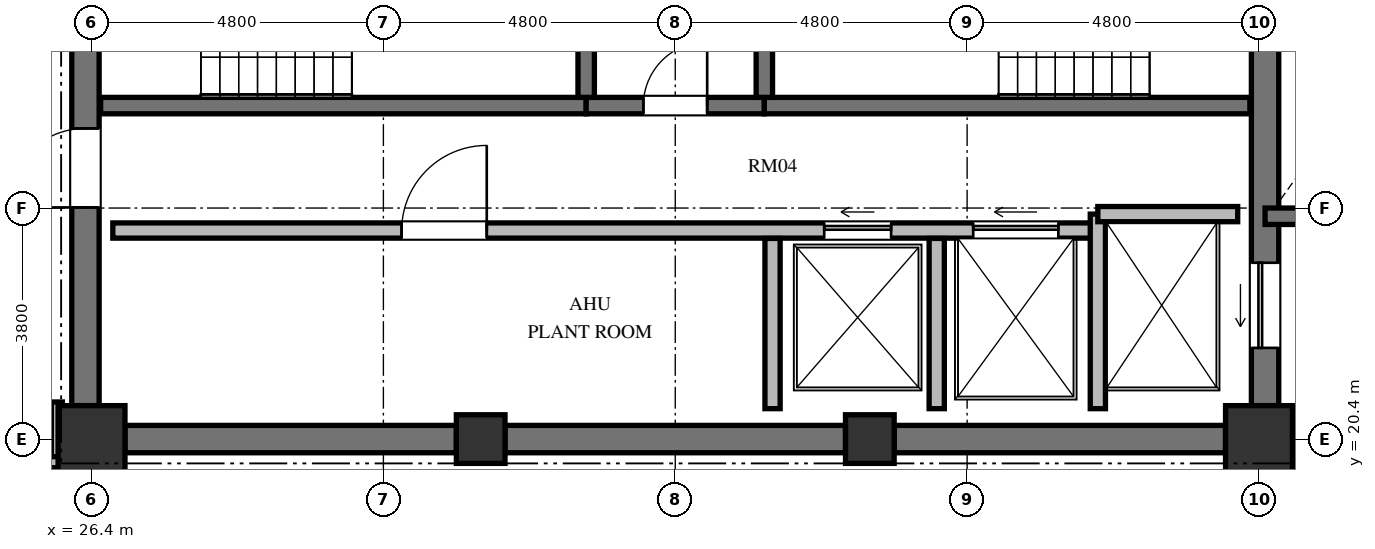
"""IFC4 building model, lengths in metres.
Left out: names, types, materials, properties, quantities, classifications, styles, units other than length and angle.
Written with IfcOpenShell. Run it as: python <this file> out.ifc"""

import sys

from ifc_helpers import new_model, si_unit, direction, frame, frame_2d, origin, origin_2d, place, context, subcontext, project, spatial, rectangle, extrude, element, fill, save


model = new_model("IFC4")
c1 = context("Model", 3, precision=1e-05, world=origin(), true_north=direction((0.0, 1.0)))
c2 = subcontext(c1, "Body", "Model", "MODEL_VIEW")
j1 = project(units=[si_unit("LENGTHUNIT", "METRE"), si_unit("PLANEANGLEUNIT", "RADIAN")], contexts=[c1])
p1 = place(None, origin())
s1 = spatial("IfcSite", under=j1, at=p1, CompositionType="ELEMENT")
p2 = place(p1, origin())
s2 = spatial("IfcBuilding", under=s1, at=p2, CompositionType="ELEMENT")
p3 = place(p2, frame((0.0, 0.0, 245.904)))
s3 = spatial("IfcBuildingStorey", under=s2, at=p3, CompositionType="ELEMENT", Elevation=245.904)
p4 = place(p3, frame((26.4, 20.4, 0.0), z_axis=(0.0, 0.0, 1.0), x_axis=(1.0, 0.0, 0.0)))
e1 = element("IfcColumn", 1, at=p4, inside=s3, PredefinedType="COLUMN", context=c2, shape_type="SweptSolid", body=[
    extrude(rectangle(XDim=1.1, YDim=1.1, at=origin_2d()), origin(), (0.0, 0.0, 1.0), 5.472),
])
for number, where, z_axis, x_axis in (
    (2, (32.8, 20.4, 0.0), (0.0, 0.0, 1.0), (1.0, 0.0, 0.0)),
    (3, (39.2, 20.4, 0.0), (0.0, 0.0, 1.0), (1.0, 0.0, 0.0)),
):
    element("IfcColumn", number, at=place(p3, frame(where, z_axis=z_axis, x_axis=x_axis)), inside=s3, PredefinedType="COLUMN", context=c2, shape_type="SweptSolid", body=[
        extrude(rectangle(XDim=0.8, YDim=0.8, at=origin_2d()), origin(), (0.0, 0.0, 1.0), 5.472),
    ])
p5 = place(p3, frame((45.6, 20.4, 0.0), z_axis=(0.0, 0.0, 1.0), x_axis=(1.0, 0.0, 0.0)))
e4 = element("IfcColumn", 4, at=p5, inside=s3, PredefinedType="COLUMN", context=c2, shape_type="SweptSolid", body=[
    extrude(rectangle(XDim=1.1, YDim=1.1, at=origin_2d()), origin(), (0.0, 0.0, 1.0), 5.472),
])
p6 = place(p3, frame((26.3, 20.95, 0.0), z_axis=(0.0, 0.0, 1.0), x_axis=(0.0, 1.0, 0.0)))
e5 = element("IfcWall", 5, at=p6, inside=s3, PredefinedType="SHEAR", context=c2, shape_type="SweptSolid", body=[
    extrude(rectangle(XDim=14.1, YDim=0.45, at=frame_2d((7.05, 0.0))), origin(), (0.0, 0.0, 1.0), 5.472),
])
p7 = place(p6, frame((6.5, 0.0, 0.0)))
e6 = element("IfcOpeningElement", 6, at=p7, cuts=e5, PredefinedType="OPENING", context=c2, shape_type="SweptSolid", body=[
    extrude(rectangle(XDim=1.2, YDim=2.15, at=frame_2d((0.6, 1.075))), frame((0.0, 0.235, 0.0), z_axis=(0.0, -1.0, 0.0), x_axis=(1.0, 0.0, 0.0)), (0.0, 0.0, 1.0), 0.47),
])
p8 = place(p6, frame((9.6, 0.0, 0.0)))
e7 = element("IfcOpeningElement", 7, at=p8, cuts=e5, PredefinedType="OPENING", context=c2, shape_type="SweptSolid", body=[
    extrude(rectangle(XDim=1.3, YDim=2.2, at=frame_2d((0.65, 1.1))), frame((0.0, 0.235, 0.0), z_axis=(0.0, -1.0, 0.0), x_axis=(1.0, 0.0, 0.0)), (0.0, 0.0, 1.0), 0.47),
])
p9 = place(p6, frame((3.26, 0.0, 0.0)))
e8 = element("IfcOpeningElement", 8, at=p9, cuts=e5, PredefinedType="OPENING", context=c2, shape_type="SweptSolid", body=[
    extrude(rectangle(XDim=1.3, YDim=2.2, at=frame_2d((0.65, 1.1))), frame((0.0, 0.235, 0.0), z_axis=(0.0, -1.0, 0.0), x_axis=(1.0, 0.0, 0.0)), (0.0, 0.0, 1.0), 0.47),
])
p10 = place(p3, frame((45.7, 20.95, 0.0), z_axis=(0.0, 0.0, 1.0), x_axis=(0.0, 1.0, 0.0)))
e9 = element("IfcWall", 9, at=p10, inside=s3, PredefinedType="SHEAR", context=c2, shape_type="SweptSolid", body=[
    extrude(rectangle(XDim=14.1, YDim=0.45, at=frame_2d((7.05, 0.0))), origin(), (0.0, 0.0, 1.0), 5.472),
])
p11 = place(p10, frame((11.75, 0.0, 0.0)))
e10 = element("IfcOpeningElement", 10, at=p11, cuts=e9, PredefinedType="OPENING", context=c2, shape_type="SweptSolid", body=[
    extrude(rectangle(XDim=1.4, YDim=2.3, at=frame_2d((0.7, 1.15))), frame((0.0, 0.235, 0.0), z_axis=(0.0, -1.0, 0.0), x_axis=(1.0, 0.0, 0.0)), (0.0, 0.0, 1.0), 0.47),
])
p12 = place(p10, frame((0.95, 0.0, 0.0)))
e11 = element("IfcOpeningElement", 11, at=p12, cuts=e9, PredefinedType="OPENING", context=c2, shape_type="SweptSolid", body=[
    extrude(rectangle(XDim=1.4, YDim=2.3, at=frame_2d((0.7, 1.15))), frame((0.0, 0.235, 0.0), z_axis=(0.0, -1.0, 0.0), x_axis=(1.0, 0.0, 0.0)), (0.0, 0.0, 1.0), 0.47),
])
p13 = place(p3, frame((26.95, 20.4, 0.0), z_axis=(0.0, 0.0, 1.0), x_axis=(1.0, 0.0, 0.0)))
e12 = element("IfcWall", 12, at=p13, inside=s3, PredefinedType="SHEAR", context=c2, shape_type="SweptSolid", body=[
    extrude(rectangle(XDim=5.45, YDim=0.45, at=frame_2d((2.725, 0.0))), origin(), (0.0, 0.0, 1.0), 5.472),
])
p14 = place(p3, frame((33.2, 20.4, 0.0), z_axis=(0.0, 0.0, 1.0), x_axis=(1.0, 0.0, 0.0)))
e13 = element("IfcWall", 13, at=p14, inside=s3, PredefinedType="SHEAR", context=c2, shape_type="SweptSolid", body=[
    extrude(rectangle(XDim=5.6, YDim=0.45, at=frame_2d((2.8, 0.0))), origin(), (0.0, 0.0, 1.0), 5.472),
])
p15 = place(p3, frame((39.6, 20.4, 0.0), z_axis=(0.0, 0.0, 1.0), x_axis=(1.0, 0.0, 0.0)))
e14 = element("IfcWall", 14, at=p15, inside=s3, PredefinedType="SHEAR", context=c2, shape_type="SweptSolid", body=[
    extrude(rectangle(XDim=5.45, YDim=0.45, at=frame_2d((2.725, 0.0))), origin(), (0.0, 0.0, 1.0), 5.472),
])
p16 = place(p3, frame((26.55, 25.885, 0.0), z_axis=(0.0, 0.0, 1.0), x_axis=(1.0, 0.0, 0.0)))
e15 = element("IfcWall", 15, at=p16, inside=s3, PredefinedType="SHEAR", context=c2, shape_type="SweptSolid", body=[
    extrude(rectangle(XDim=7.985, YDim=0.27, at=frame_2d((3.992, 0.0))), origin(), (0.0, 0.0, 1.0), 5.472),
])
p17 = place(p3, frame((34.535, 25.885, 0.0), z_axis=(0.0, 0.0, 1.0), x_axis=(1.0, 0.0, 0.0)))
e16 = element("IfcWall", 16, at=p17, inside=s3, PredefinedType="SHEAR", context=c2, shape_type="SweptSolid", body=[
    extrude(rectangle(XDim=2.93, YDim=0.27, at=frame_2d((1.465, 0.0))), origin(), (0.0, 0.0, 1.0), 5.472),
])
p18 = place(p17, frame((0.94, 0.0, 0.0)))
e17 = element("IfcOpeningElement", 17, at=p18, cuts=e16, PredefinedType="OPENING", context=c2, shape_type="SweptSolid", body=[
    extrude(rectangle(XDim=1.05, YDim=2.15, at=frame_2d((0.525, 1.075))), frame((0.0, 0.145, 0.0), z_axis=(0.0, -1.0, 0.0), x_axis=(1.0, 0.0, 0.0)), (0.0, 0.0, 1.0), 0.29),
])
p19 = place(p3, frame((37.465, 25.885, 0.0), z_axis=(0.0, 0.0, 1.0), x_axis=(1.0, 0.0, 0.0)))
e18 = element("IfcWall", 18, at=p19, inside=s3, PredefinedType="SHEAR", context=c2, shape_type="SweptSolid", body=[
    extrude(rectangle(XDim=7.985, YDim=0.27, at=frame_2d((3.992, 0.0))), origin(), (0.0, 0.0, 1.0), 5.472),
])
for number, where, z_axis, x_axis in (
    (19, (34.535, 26.02, 0.0), (0.0, 0.0, 1.0), (0.0, 1.0, 0.0)),
    (20, (37.465, 26.02, 0.0), (0.0, 0.0, 1.0), (0.0, 1.0, 0.0)),
):
    element("IfcWall", number, at=place(p3, frame(where, z_axis=z_axis, x_axis=x_axis)), inside=s3, PredefinedType="SHEAR", context=c2, shape_type="SweptSolid", body=[
        extrude(rectangle(XDim=4.08, YDim=0.27, at=frame_2d((2.04, 0.0))), origin(), (0.0, 0.0, 1.0), 5.472),
    ])
p20 = place(p3, frame((26.75, 23.83, 0.0), z_axis=(0.0, 0.0, 1.0), x_axis=(1.0, 0.0, 0.0)))
e21 = element("IfcWall", 21, at=p20, inside=s3, PredefinedType="SOLIDWALL", context=c2, shape_type="SweptSolid", body=[
    extrude(rectangle(XDim=16.2, YDim=0.25, at=frame_2d((8.1, 0.0))), origin(), (0.0, 0.0, 1.0), 5.272),
])
p21 = place(p20, frame((4.75, 0.0, 0.0)))
e22 = element("IfcOpeningElement", 22, at=p21, cuts=e21, PredefinedType="OPENING", context=c2, shape_type="SweptSolid", body=[
    extrude(rectangle(XDim=1.4, YDim=2.2, at=frame_2d((0.7, 1.1))), frame((0.0, 0.135, 0.0), z_axis=(0.0, -1.0, 0.0), x_axis=(1.0, 0.0, 0.0)), (0.0, 0.0, 1.0), 0.27),
])
p22 = place(p20, frame((11.7, 0.0, 0.0)))
e23 = element("IfcOpeningElement", 23, at=p22, cuts=e21, PredefinedType="OPENING", context=c2, shape_type="SweptSolid", body=[
    extrude(rectangle(XDim=1.1, YDim=2.2, at=frame_2d((0.55, 1.1))), frame((0.0, 0.135, 0.0), z_axis=(0.0, -1.0, 0.0), x_axis=(1.0, 0.0, 0.0)), (0.0, 0.0, 1.0), 0.27),
])
p23 = place(p20, frame((14.15, 0.0, 0.0)))
e24 = element("IfcOpeningElement", 24, at=p23, cuts=e21, PredefinedType="OPENING", context=c2, shape_type="SweptSolid", body=[
    extrude(rectangle(XDim=1.4, YDim=2.3, at=frame_2d((0.7, 1.15))), frame((0.0, 0.135, 0.0), z_axis=(0.0, -1.0, 0.0), x_axis=(1.0, 0.0, 0.0)), (0.0, 0.0, 1.0), 0.27),
])
p24 = place(p3, frame((42.95, 20.9, 0.0), z_axis=(0.0, 0.0, 1.0), x_axis=(0.0, 1.0, 0.0)))
e25 = element("IfcWall", 25, at=p24, inside=s3, PredefinedType="SOLIDWALL", context=c2, shape_type="SweptSolid", body=[
    extrude(rectangle(XDim=3.2, YDim=0.25, at=frame_2d((1.6, 0.0))), origin(), (0.0, 0.0, 1.0), 5.272),
])
p25 = place(p3, frame((42.95, 24.1, 0.0), z_axis=(0.0, 0.0, 1.0), x_axis=(1.0, 0.0, 0.0)))
e26 = element("IfcWall", 26, at=p25, inside=s3, PredefinedType="SOLIDWALL", context=c2, shape_type="SweptSolid", body=[
    extrude(rectangle(XDim=2.3, YDim=0.25, at=frame_2d((1.15, 0.0))), origin(), (0.0, 0.0, 1.0), 5.272),
])
for number, where, z_axis, x_axis in (
    (27, (37.6, 20.9, 0.0), (0.0, 0.0, 1.0), (0.0, 1.0, 0.0)),
    (28, (40.3, 20.9, 0.0), (0.0, 0.0, 1.0), (0.0, 1.0, 0.0)),
):
    element("IfcWall", number, at=place(p3, frame(where, z_axis=z_axis, x_axis=x_axis)), inside=s3, PredefinedType="SOLIDWALL", context=c2, shape_type="SweptSolid", body=[
        extrude(rectangle(XDim=2.8, YDim=0.25, at=frame_2d((1.4, 0.0))), origin(), (0.0, 0.0, 1.0), 5.272),
    ])
p26 = place(p3, frame((45.7, 24.065, 0.0), z_axis=(0.0, 0.0, 1.0), x_axis=(1.0, 0.0, 0.0)))
e29 = element("IfcWall", 29, at=p26, inside=s3, PredefinedType="SHEAR", context=c2, shape_type="SweptSolid", body=[
    extrude(rectangle(XDim=4.715, YDim=0.27, at=frame_2d((2.357, 0.0))), origin(), (0.0, 0.0, 1.0), 5.472),
])
p27 = place(p3, frame((45.7, 20.02, 0.0), z_axis=(0.0, 0.0, 1.0), x_axis=(1.0, 0.0, 0.0)))
e30 = element("IfcWall", 30, at=p27, inside=s3, PredefinedType="SOLIDWALL", context=c2, shape_type="SweptSolid", body=[
    extrude(rectangle(XDim=4.715, YDim=0.25, at=frame_2d((2.357, 0.0))), origin(), (0.0, 0.0, 1.0), 5.272),
])
p28 = place(p3, frame((25.83, 21.01, 0.0), z_axis=(0.0, 0.0, 1.0), x_axis=(0.0, -1.0, 0.0)))
e31 = element("IfcWall", 31, at=p28, inside=s3, PredefinedType="PARTITIONING", context=c2, shape_type="SweptSolid", body=[
    extrude(rectangle(XDim=1.03, YDim=0.18, at=frame_2d((0.515, 0.0))), origin(), (0.0, 0.0, 1.0), 5.272),
])
p29 = place(p3, frame((25.87, 20.02, 0.0), z_axis=(0.0, 0.0, 1.0), x_axis=(-1.0, 0.0, 0.0)))
e32 = element("IfcWall", 32, at=p29, inside=s3, PredefinedType="PARTITIONING", context=c2, shape_type="SweptSolid", body=[
    extrude(rectangle(XDim=2.56, YDim=0.18, at=frame_2d((1.28, 0.0))), origin(), (0.0, 0.0, 1.0), 5.272),
])
p30 = place(p18, origin())
e33 = element("IfcDoor", 33, at=p30, inside=s3, OperationType="SINGLE_SWING_RIGHT", PredefinedType="DOOR", context=c2, shape_type="SweptSolid", body=[
    extrude(rectangle(XDim=1.05, YDim=2.15, at=frame_2d((0.525, 1.075))), frame((0.0, 0.025, 0.0), z_axis=(0.0, -1.0, 0.0), x_axis=(1.0, 0.0, 0.0)), (0.0, 0.0, 1.0), 0.05),
])
fill(e17, e33)
p31 = place(p9, origin())
e34 = element("IfcDoor", 34, at=p31, inside=s3, OperationType="SINGLE_SWING_LEFT", PredefinedType="DOOR", context=c2, shape_type="SweptSolid", body=[
    extrude(rectangle(XDim=1.3, YDim=2.2, at=frame_2d((0.65, 1.1))), frame((0.0, 0.025, 0.0), z_axis=(0.0, -1.0, 0.0), x_axis=(1.0, 0.0, 0.0)), (0.0, 0.0, 1.0), 0.05),
])
fill(e8, e34)
p32 = place(p21, origin())
e35 = element("IfcDoor", 35, at=p32, inside=s3, OperationType="SINGLE_SWING_RIGHT", PredefinedType="DOOR", context=c2, shape_type="SweptSolid", body=[
    extrude(rectangle(XDim=1.4, YDim=2.2, at=frame_2d((0.7, 1.1))), frame((0.0, 0.025, 0.0), z_axis=(0.0, -1.0, 0.0), x_axis=(1.0, 0.0, 0.0)), (0.0, 0.0, 1.0), 0.05),
])
fill(e22, e35)
p33 = place(p22, origin())
e36 = element("IfcDoor", 36, at=p33, inside=s3, OperationType="SLIDING_TO_LEFT", PredefinedType="DOOR", context=c2, shape_type="SweptSolid", body=[
    extrude(rectangle(XDim=1.1, YDim=2.2, at=frame_2d((0.55, 1.1))), frame((0.0, 0.025, 0.0), z_axis=(0.0, -1.0, 0.0), x_axis=(1.0, 0.0, 0.0)), (0.0, 0.0, 1.0), 0.05),
])
fill(e23, e36)
p34 = place(p12, origin())
e37 = element("IfcDoor", 37, at=p34, inside=s3, OperationType="SLIDING_TO_LEFT", PredefinedType="DOOR", context=c2, shape_type="SweptSolid", body=[
    extrude(rectangle(XDim=1.4, YDim=2.3, at=frame_2d((0.7, 1.15))), frame((0.0, 0.025, 0.0), z_axis=(0.0, -1.0, 0.0), x_axis=(1.0, 0.0, 0.0)), (0.0, 0.0, 1.0), 0.05),
])
fill(e11, e37)
p35 = place(p23, origin())
e38 = element("IfcDoor", 38, at=p35, inside=s3, OperationType="SLIDING_TO_LEFT", PredefinedType="DOOR", context=c2, shape_type="SweptSolid", body=[
    extrude(rectangle(XDim=1.4, YDim=2.3, at=frame_2d((0.7, 1.15))), frame((0.0, 0.025, 0.0), z_axis=(0.0, -1.0, 0.0), x_axis=(1.0, 0.0, 0.0)), (0.0, 0.0, 1.0), 0.05),
])
fill(e24, e38)
save(model, sys.argv[1])
